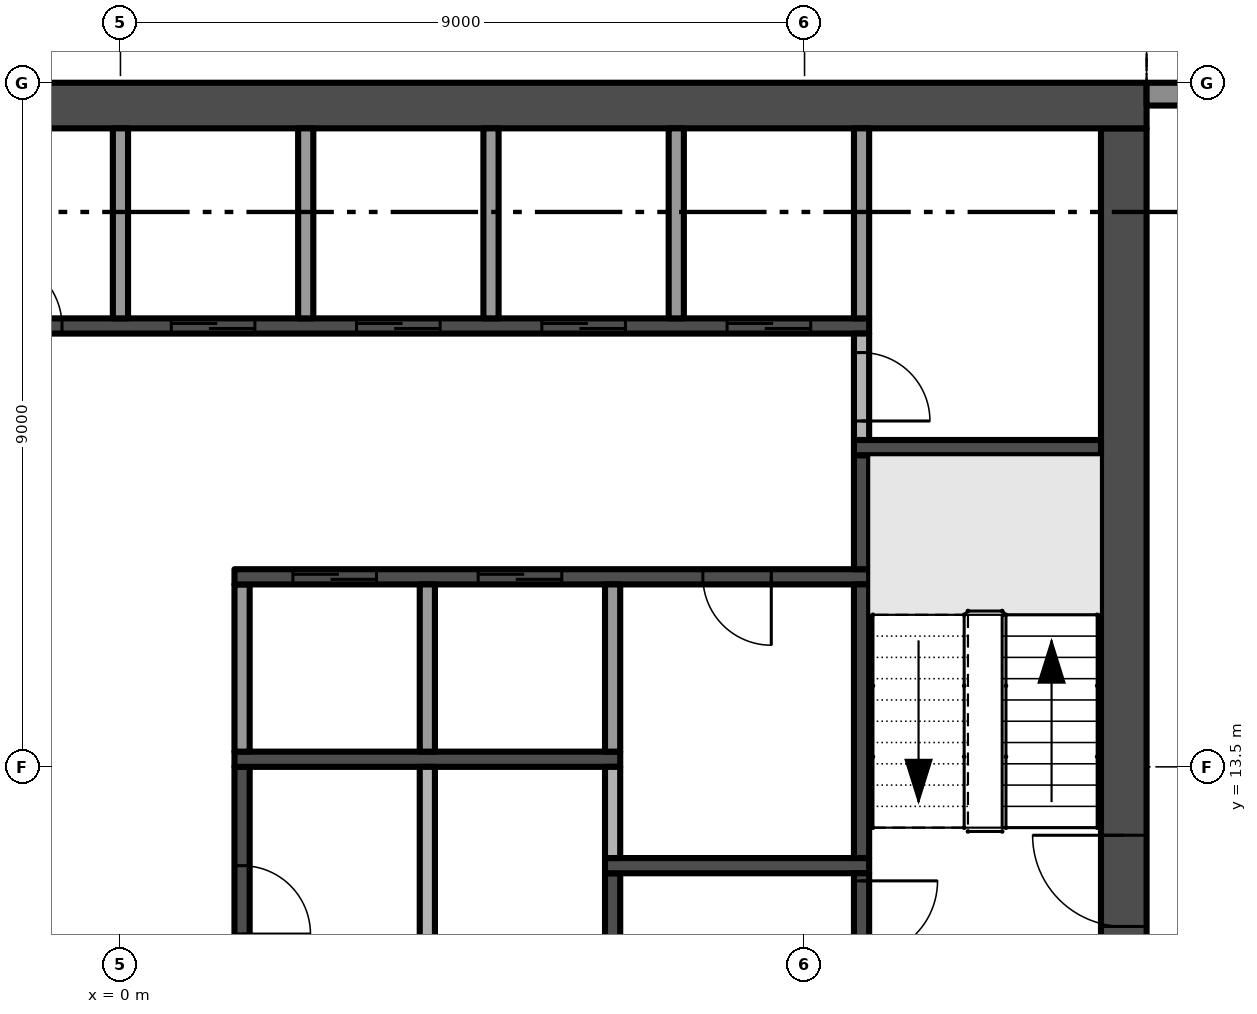
"""IFC4 building model, lengths in metres.
Left out: names, types, materials, properties, quantities, classifications, styles, units other than length and angle.
Written with IfcOpenShell. Run it as: python <this file> out.ifc"""

import sys

from ifc_helpers import new_model, si_unit, direction, frame, frame_2d, origin, place, context, subcontext, project, spatial, polyline, rectangle, outline, extrude, element, fill, save


model = new_model("IFC4")
c1 = context("Model", 3, precision=1e-05, world=origin(), true_north=direction((0.0, 1.0)))
c2 = subcontext(c1, "Body", "Model", "MODEL_VIEW")
j1 = project(units=[si_unit("LENGTHUNIT", "METRE"), si_unit("PLANEANGLEUNIT", "RADIAN")], contexts=[c1])
p1 = place(None, origin())
s1 = spatial("IfcSite", under=j1, at=p1, CompositionType="ELEMENT")
p2 = place(p1, origin())
s2 = spatial("IfcBuilding", under=s1, at=p2, CompositionType="ELEMENT")
p3 = place(p2, frame((0.0, 0.0, 250.2)))
s3 = spatial("IfcBuildingStorey", under=s2, at=p3, CompositionType="ELEMENT", Elevation=250.2)
p4 = place(p3, frame((13.2, 5.1, -0.3), z_axis=(0.0, 0.0, 1.0), x_axis=(0.0, 1.0, 0.0)))
e1 = element("IfcWall", 1, at=p4, inside=s3, PredefinedType="SHEAR", context=c2, shape_type="SweptSolid", body=[
    extrude(rectangle(XDim=16.8, YDim=0.6, at=frame_2d((8.4, 0.0))), origin(), (0.0, 0.0, 1.0), 3.8),
])
p5 = place(p4, frame((6.3, 0.0, 0.3)))
e2 = element("IfcOpeningElement", 2, at=p5, cuts=e1, PredefinedType="OPENING", context=c2, shape_type="SweptSolid", body=[
    extrude(rectangle(XDim=1.2, YDim=2.2, at=frame_2d((0.6, 1.1))), frame((0.0, 0.31, 0.0), z_axis=(0.0, -1.0, 0.0), x_axis=(1.0, 0.0, 0.0)), (0.0, 0.0, 1.0), 0.62),
])
p6 = place(p3, frame((13.5, 22.2, -0.3), z_axis=(0.0, 0.0, 1.0), x_axis=(-1.0, 0.0, 0.0)))
e3 = element("IfcWall", 3, at=p6, inside=s3, PredefinedType="SHEAR", context=c2, shape_type="SweptSolid", body=[
    extrude(rectangle(XDim=27.0, YDim=0.6, at=frame_2d((13.5, 0.0))), origin(), (0.0, 0.0, 1.0), 3.8),
])
p7 = place(p3, frame((13.5, 22.35, 0.0), z_axis=(0.0, 0.0, 1.0), x_axis=(1.0, 0.0, 0.0)))
e4 = element("IfcWall", 4, at=p7, inside=s3, PredefinedType="SOLIDWALL", context=c2, shape_type="SweptSolid", body=[
    extrude(rectangle(XDim=4.05, YDim=0.3, at=frame_2d((2.025, 0.0))), origin(), (0.0, 0.0, 1.0), 3.5),
])
p8 = place(p7, frame((0.55, 0.0, 0.45)))
e5 = element("IfcOpeningElement", 5, at=p8, cuts=e4, PredefinedType="OPENING", context=c2, shape_type="SweptSolid", body=[
    extrude(rectangle(XDim=3.2, YDim=2.65, at=frame_2d((1.6, 1.325))), frame((0.0, 0.16, 0.0), z_axis=(0.0, -1.0, 0.0), x_axis=(1.0, 0.0, 0.0)), (0.0, 0.0, 1.0), 0.32),
])
p9 = place(p3, origin())
e6 = element("IfcWall", 6, at=p9, inside=s3, PredefinedType="USERDEFINED", context=c2, shape_type="SweptSolid", body=[
    extrude(outline(polyline([(22.5, 25.5), (21.0, 25.271), (19.5, 24.671), (18.0, 23.929), (16.5, 23.329), (15.0, 23.1), (13.5, 23.329), (13.462, 23.082), (15.0, 22.847), (16.566, 23.086), (18.102, 23.701), (19.602, 24.442), (21.066, 25.028), (22.538, 25.253), (22.5, 25.5)])), origin(), (0.0, 0.0, 1.0), 0.9),
])
p10 = place(p3, frame((-9.85, 19.3, 0.0), z_axis=(0.0, 0.0, 1.0), x_axis=(1.0, 0.0, 0.0)))
e7 = element("IfcWall", 7, at=p10, inside=s3, PredefinedType="SHEAR", context=c2, shape_type="SweptSolid", body=[
    extrude(rectangle(XDim=19.7, YDim=0.2, at=frame_2d((9.85, 0.0))), origin(), (0.0, 0.0, 1.0), 3.5),
])
p11 = place(p10, frame((10.519, 0.0, 0.0)))
e8 = element("IfcOpeningElement", 8, at=p11, cuts=e7, PredefinedType="OPENING", context=c2, shape_type="SweptSolid", body=[
    extrude(rectangle(XDim=1.1, YDim=2.1, at=frame_2d((0.55, 1.05))), frame((0.0, 0.11, 0.0), z_axis=(0.0, -1.0, 0.0), x_axis=(1.0, 0.0, 0.0)), (0.0, 0.0, 1.0), 0.22),
])
p12 = place(p10, frame((12.956, 0.0, 0.0)))
e9 = element("IfcOpeningElement", 9, at=p12, cuts=e7, PredefinedType="OPENING", context=c2, shape_type="SweptSolid", body=[
    extrude(rectangle(XDim=1.1, YDim=2.1, at=frame_2d((0.55, 1.05))), frame((0.0, 0.11, 0.0), z_axis=(0.0, -1.0, 0.0), x_axis=(1.0, 0.0, 0.0)), (0.0, 0.0, 1.0), 0.22),
])
p13 = place(p10, frame((15.394, 0.0, 0.0)))
e10 = element("IfcOpeningElement", 10, at=p13, cuts=e7, PredefinedType="OPENING", context=c2, shape_type="SweptSolid", body=[
    extrude(rectangle(XDim=1.1, YDim=2.1, at=frame_2d((0.55, 1.05))), frame((0.0, 0.11, 0.0), z_axis=(0.0, -1.0, 0.0), x_axis=(1.0, 0.0, 0.0)), (0.0, 0.0, 1.0), 0.22),
])
p14 = place(p10, frame((17.831, 0.0, 0.0)))
e11 = element("IfcOpeningElement", 11, at=p14, cuts=e7, PredefinedType="OPENING", context=c2, shape_type="SweptSolid", body=[
    extrude(rectangle(XDim=1.1, YDim=2.1, at=frame_2d((0.55, 1.05))), frame((0.0, 0.11, 0.0), z_axis=(0.0, -1.0, 0.0), x_axis=(1.0, 0.0, 0.0)), (0.0, 0.0, 1.0), 0.22),
])
p15 = place(p10, frame((0.869, 0.0, 0.0)))
e12 = element("IfcOpeningElement", 12, at=p15, cuts=e7, PredefinedType="OPENING", context=c2, shape_type="SweptSolid", body=[
    extrude(rectangle(XDim=0.9, YDim=2.1, at=frame_2d((0.45, 1.05))), frame((0.0, 0.11, 0.0), z_axis=(0.0, -1.0, 0.0), x_axis=(1.0, 0.0, 0.0)), (0.0, 0.0, 1.0), 0.22),
])
p16 = place(p10, frame((4.525, 0.0, 0.0)))
e13 = element("IfcOpeningElement", 13, at=p16, cuts=e7, PredefinedType="OPENING", context=c2, shape_type="SweptSolid", body=[
    extrude(rectangle(XDim=0.9, YDim=2.1, at=frame_2d((0.45, 1.05))), frame((0.0, 0.11, 0.0), z_axis=(0.0, -1.0, 0.0), x_axis=(1.0, 0.0, 0.0)), (0.0, 0.0, 1.0), 0.22),
])
p17 = place(p10, frame((8.181, 0.0, 0.0)))
e14 = element("IfcOpeningElement", 14, at=p17, cuts=e7, PredefinedType="OPENING", context=c2, shape_type="SweptSolid", body=[
    extrude(rectangle(XDim=0.9, YDim=2.1, at=frame_2d((0.45, 1.05))), frame((0.0, 0.11, 0.0), z_axis=(0.0, -1.0, 0.0), x_axis=(1.0, 0.0, 0.0)), (0.0, 0.0, 1.0), 0.22),
])
p18 = place(p3, frame((0.0, 19.4, 0.0), z_axis=(0.0, 0.0, 1.0), x_axis=(0.0, 1.0, 0.0)))
e15 = element("IfcWall", 15, at=p18, inside=s3, PredefinedType="PARTITIONING", context=c2, shape_type="SweptSolid", body=[
    extrude(rectangle(XDim=2.5, YDim=0.2, at=frame_2d((1.25, 0.0))), origin(), (0.0, 0.0, 1.0), 3.5),
])
p19 = place(p3, frame((1.6, 13.5, 0.0), z_axis=(0.0, 0.0, 1.0), x_axis=(0.0, -1.0, 0.0)))
e16 = element("IfcWall", 16, at=p19, inside=s3, PredefinedType="SHEAR", context=c2, shape_type="SweptSolid", body=[
    extrude(rectangle(XDim=3.5, YDim=0.2, at=frame_2d((1.75, 0.0))), origin(), (0.0, 0.0, 1.0), 3.5),
])
p20 = place(p19, frame((1.3, 0.0, 0.0)))
e17 = element("IfcOpeningElement", 17, at=p20, cuts=e16, PredefinedType="OPENING", context=c2, shape_type="SweptSolid", body=[
    extrude(rectangle(XDim=0.9, YDim=2.1, at=frame_2d((0.45, 1.05))), frame((0.0, 0.11, 0.0), z_axis=(0.0, -1.0, 0.0), x_axis=(1.0, 0.0, 0.0)), (0.0, 0.0, 1.0), 0.22),
])
p21 = place(p3, frame((1.5, 13.6, 0.0), z_axis=(0.0, 0.0, 1.0), x_axis=(1.0, 0.0, 0.0)))
e18 = element("IfcWall", 18, at=p21, inside=s3, PredefinedType="SHEAR", context=c2, shape_type="SweptSolid", body=[
    extrude(rectangle(XDim=5.075, YDim=0.2, at=frame_2d((2.538, 0.0))), origin(), (0.0, 0.0, 1.0), 3.5),
])
p22 = place(p3, frame((1.6, 13.7, 0.0), z_axis=(0.0, 0.0, 1.0), x_axis=(0.0, 1.0, 0.0)))
e19 = element("IfcWall", 19, at=p22, inside=s3, PredefinedType="PARTITIONING", context=c2, shape_type="SweptSolid", body=[
    extrude(rectangle(XDim=2.2, YDim=0.2, at=frame_2d((1.1, 0.0))), origin(), (0.0, 0.0, 1.0), 3.5),
])
p23 = place(p3, frame((9.85, 16.0, 0.0), z_axis=(0.0, 0.0, 1.0), x_axis=(-1.0, 0.0, 0.0)))
e20 = element("IfcWall", 20, at=p23, inside=s3, PredefinedType="SHEAR", context=c2, shape_type="SweptSolid", body=[
    extrude(rectangle(XDim=8.35, YDim=0.2, at=frame_2d((4.175, 0.0))), origin(), (0.0, 0.0, 1.0), 3.5),
])
p24 = place(p23, frame((6.481, 0.0, 0.0)))
e21 = element("IfcOpeningElement", 21, at=p24, cuts=e20, PredefinedType="OPENING", context=c2, shape_type="SweptSolid", body=[
    extrude(rectangle(XDim=1.1, YDim=2.1, at=frame_2d((0.55, 1.05))), frame((0.0, 0.11, 0.0), z_axis=(0.0, -1.0, 0.0), x_axis=(1.0, 0.0, 0.0)), (0.0, 0.0, 1.0), 0.22),
])
p25 = place(p23, frame((4.044, 0.0, 0.0)))
e22 = element("IfcOpeningElement", 22, at=p25, cuts=e20, PredefinedType="OPENING", context=c2, shape_type="SweptSolid", body=[
    extrude(rectangle(XDim=1.1, YDim=2.1, at=frame_2d((0.55, 1.05))), frame((0.0, 0.11, 0.0), z_axis=(0.0, -1.0, 0.0), x_axis=(1.0, 0.0, 0.0)), (0.0, 0.0, 1.0), 0.22),
])
p26 = place(p23, frame((1.288, 0.0, 0.0)))
e23 = element("IfcOpeningElement", 23, at=p26, cuts=e20, PredefinedType="OPENING", context=c2, shape_type="SweptSolid", body=[
    extrude(rectangle(XDim=0.9, YDim=2.1, at=frame_2d((0.45, 1.05))), frame((0.0, 0.11, 0.0), z_axis=(0.0, -1.0, 0.0), x_axis=(1.0, 0.0, 0.0)), (0.0, 0.0, 1.0), 0.22),
])
p27 = place(p3, frame((2.438, 19.4, 0.0), z_axis=(0.0, 0.0, 1.0), x_axis=(0.0, 1.0, 0.0)))
e24 = element("IfcWall", 24, at=p27, inside=s3, PredefinedType="PARTITIONING", context=c2, shape_type="SweptSolid", body=[
    extrude(rectangle(XDim=2.5, YDim=0.2, at=frame_2d((1.25, 0.0))), origin(), (0.0, 0.0, 1.0), 3.5),
])
p28 = place(p3, frame((4.037, 10.0, 0.0), z_axis=(0.0, 0.0, 1.0), x_axis=(0.0, 1.0, 0.0)))
e25 = element("IfcWall", 25, at=p28, inside=s3, PredefinedType="PARTITIONING", context=c2, shape_type="SweptSolid", body=[
    extrude(rectangle(XDim=3.5, YDim=0.2, at=frame_2d((1.75, 0.0))), origin(), (0.0, 0.0, 1.0), 3.5),
])
p29 = place(p3, frame((4.037, 13.7, 0.0), z_axis=(0.0, 0.0, 1.0), x_axis=(0.0, 1.0, 0.0)))
e26 = element("IfcWall", 26, at=p29, inside=s3, PredefinedType="PARTITIONING", context=c2, shape_type="SweptSolid", body=[
    extrude(rectangle(XDim=2.2, YDim=0.2, at=frame_2d((1.1, 0.0))), origin(), (0.0, 0.0, 1.0), 3.5),
])
p30 = place(p3, frame((4.875, 19.4, 0.0), z_axis=(0.0, 0.0, 1.0), x_axis=(0.0, 1.0, 0.0)))
e27 = element("IfcWall", 27, at=p30, inside=s3, PredefinedType="PARTITIONING", context=c2, shape_type="SweptSolid", body=[
    extrude(rectangle(XDim=2.5, YDim=0.2, at=frame_2d((1.25, 0.0))), origin(), (0.0, 0.0, 1.0), 3.5),
])
p31 = place(p3, frame((6.475, 10.0, 0.0), z_axis=(0.0, 0.0, 1.0), x_axis=(0.0, 1.0, 0.0)))
e28 = element("IfcWall", 28, at=p31, inside=s3, PredefinedType="SHEAR", context=c2, shape_type="SweptSolid", body=[
    extrude(rectangle(XDim=2.1, YDim=0.2, at=frame_2d((1.05, 0.0))), origin(), (0.0, 0.0, 1.0), 3.5),
])
p32 = place(p3, frame((6.375, 12.2, 0.0), z_axis=(0.0, 0.0, 1.0), x_axis=(1.0, 0.0, 0.0)))
e29 = element("IfcWall", 29, at=p32, inside=s3, PredefinedType="SHEAR", context=c2, shape_type="SweptSolid", body=[
    extrude(rectangle(XDim=3.475, YDim=0.2, at=frame_2d((1.738, 0.0))), origin(), (0.0, 0.0, 1.0), 3.5),
])
p33 = place(p3, frame((6.475, 12.3, 0.0), z_axis=(0.0, 0.0, 1.0), x_axis=(0.0, 1.0, 0.0)))
e30 = element("IfcWall", 30, at=p33, inside=s3, PredefinedType="PARTITIONING", context=c2, shape_type="SweptSolid", body=[
    extrude(rectangle(XDim=1.2, YDim=0.2, at=frame_2d((0.6, 0.0))), origin(), (0.0, 0.0, 1.0), 3.5),
])
p34 = place(p3, frame((6.475, 13.7, 0.0), z_axis=(0.0, 0.0, 1.0), x_axis=(0.0, 1.0, 0.0)))
e31 = element("IfcWall", 31, at=p34, inside=s3, PredefinedType="PARTITIONING", context=c2, shape_type="SweptSolid", body=[
    extrude(rectangle(XDim=2.2, YDim=0.2, at=frame_2d((1.1, 0.0))), origin(), (0.0, 0.0, 1.0), 3.5),
])
p35 = place(p3, frame((7.312, 19.4, 0.0), z_axis=(0.0, 0.0, 1.0), x_axis=(0.0, 1.0, 0.0)))
e32 = element("IfcWall", 32, at=p35, inside=s3, PredefinedType="PARTITIONING", context=c2, shape_type="SweptSolid", body=[
    extrude(rectangle(XDim=2.5, YDim=0.2, at=frame_2d((1.25, 0.0))), origin(), (0.0, 0.0, 1.0), 3.5),
])
p36 = place(p3, frame((9.75, 12.1, 0.0), z_axis=(0.0, 0.0, 1.0), x_axis=(0.0, -1.0, 0.0)))
e33 = element("IfcWall", 33, at=p36, inside=s3, PredefinedType="SHEAR", context=c2, shape_type="SweptSolid", body=[
    extrude(rectangle(XDim=1.9, YDim=0.2, at=frame_2d((0.95, 0.0))), origin(), (0.0, 0.0, 1.0), 3.5),
])
p37 = place(p36, frame((0.1, 0.0, 0.0)))
e34 = element("IfcOpeningElement", 34, at=p37, cuts=e33, PredefinedType="OPENING", context=c2, shape_type="SweptSolid", body=[
    extrude(rectangle(XDim=1.0, YDim=2.2, at=frame_2d((0.5, 1.1))), frame((0.0, 0.11, 0.0), z_axis=(0.0, -1.0, 0.0), x_axis=(1.0, 0.0, 0.0)), (0.0, 0.0, 1.0), 0.22),
])
p38 = place(p3, frame((9.75, 12.3, 0.0), z_axis=(0.0, 0.0, 1.0), x_axis=(0.0, 1.0, 0.0)))
e35 = element("IfcWall", 35, at=p38, inside=s3, PredefinedType="SHEAR", context=c2, shape_type="SweptSolid", body=[
    extrude(rectangle(XDim=3.6, YDim=0.2, at=frame_2d((1.8, 0.0))), origin(), (0.0, 0.0, 1.0), 3.5),
])
p39 = place(p3, frame((9.75, 16.1, 0.0), z_axis=(0.0, 0.0, 1.0), x_axis=(0.0, 1.0, 0.0)))
e36 = element("IfcWall", 36, at=p39, inside=s3, PredefinedType="SHEAR", context=c2, shape_type="SweptSolid", body=[
    extrude(rectangle(XDim=1.5, YDim=0.2, at=frame_2d((0.75, 0.0))), origin(), (0.0, 0.0, 1.0), 3.5),
])
p40 = place(p3, frame((9.65, 17.7, 0.0), z_axis=(0.0, 0.0, 1.0), x_axis=(1.0, 0.0, 0.0)))
e37 = element("IfcWall", 37, at=p40, inside=s3, PredefinedType="SHEAR", context=c2, shape_type="SweptSolid", body=[
    extrude(rectangle(XDim=3.25, YDim=0.2, at=frame_2d((1.625, 0.0))), origin(), (0.0, 0.0, 1.0), 3.5),
])
p41 = place(p3, frame((9.75, 19.2, 0.0), z_axis=(0.0, 0.0, 1.0), x_axis=(0.0, -1.0, 0.0)))
e38 = element("IfcWall", 38, at=p41, inside=s3, PredefinedType="PARTITIONING", context=c2, shape_type="SweptSolid", body=[
    extrude(rectangle(XDim=1.4, YDim=0.2, at=frame_2d((0.7, 0.0))), origin(), (0.0, 0.0, 1.0), 3.5),
])
p42 = place(p41, frame((0.25, 0.0, 0.0)))
e39 = element("IfcOpeningElement", 39, at=p42, cuts=e38, PredefinedType="OPENING", context=c2, shape_type="SweptSolid", body=[
    extrude(rectangle(XDim=0.9, YDim=2.1, at=frame_2d((0.45, 1.05))), frame((0.0, 0.11, 0.0), z_axis=(0.0, -1.0, 0.0), x_axis=(1.0, 0.0, 0.0)), (0.0, 0.0, 1.0), 0.22),
])
p43 = place(p3, frame((9.75, 19.4, 0.0), z_axis=(0.0, 0.0, 1.0), x_axis=(0.0, 1.0, 0.0)))
e40 = element("IfcWall", 40, at=p43, inside=s3, PredefinedType="PARTITIONING", context=c2, shape_type="SweptSolid", body=[
    extrude(rectangle(XDim=2.5, YDim=0.2, at=frame_2d((1.25, 0.0))), origin(), (0.0, 0.0, 1.0), 3.5),
])
p44 = place(p5, frame((1.2, 0.0, 0.0), z_axis=(0.0, 0.0, 1.0), x_axis=(-1.0, 0.0, 0.0)))
e41 = element("IfcDoor", 41, at=p44, inside=s3, OperationType="SINGLE_SWING_LEFT", PredefinedType="DOOR", context=c2, shape_type="SweptSolid", body=[
    extrude(rectangle(XDim=1.2, YDim=2.2, at=frame_2d((0.6, 1.1))), frame((0.0, 0.025, 0.0), z_axis=(0.0, -1.0, 0.0), x_axis=(1.0, 0.0, 0.0)), (0.0, 0.0, 1.0), 0.05),
])
fill(e2, e41)
p45 = place(p37, origin())
e42 = element("IfcDoor", 42, at=p45, inside=s3, OperationType="SINGLE_SWING_LEFT", PredefinedType="DOOR", context=c2, shape_type="SweptSolid", body=[
    extrude(rectangle(XDim=1.0, YDim=2.2, at=frame_2d((0.5, 1.1))), frame((0.0, 0.025, 0.0), z_axis=(0.0, -1.0, 0.0), x_axis=(1.0, 0.0, 0.0)), (0.0, 0.0, 1.0), 0.05),
])
fill(e34, e42)
p46 = place(p11, origin())
e43 = element("IfcDoor", 43, at=p46, inside=s3, OperationType="SLIDING_TO_RIGHT", PredefinedType="DOOR", context=c2, shape_type="SweptSolid", body=[
    extrude(rectangle(XDim=1.1, YDim=2.1, at=frame_2d((0.55, 1.05))), frame((0.0, 0.025, 0.0), z_axis=(0.0, -1.0, 0.0), x_axis=(1.0, 0.0, 0.0)), (0.0, 0.0, 1.0), 0.05),
])
fill(e8, e43)
p47 = place(p12, origin())
e44 = element("IfcDoor", 44, at=p47, inside=s3, OperationType="SLIDING_TO_RIGHT", PredefinedType="DOOR", context=c2, shape_type="SweptSolid", body=[
    extrude(rectangle(XDim=1.1, YDim=2.1, at=frame_2d((0.55, 1.05))), frame((0.0, 0.025, 0.0), z_axis=(0.0, -1.0, 0.0), x_axis=(1.0, 0.0, 0.0)), (0.0, 0.0, 1.0), 0.05),
])
fill(e9, e44)
p48 = place(p13, origin())
e45 = element("IfcDoor", 45, at=p48, inside=s3, OperationType="SLIDING_TO_RIGHT", PredefinedType="DOOR", context=c2, shape_type="SweptSolid", body=[
    extrude(rectangle(XDim=1.1, YDim=2.1, at=frame_2d((0.55, 1.05))), frame((0.0, 0.025, 0.0), z_axis=(0.0, -1.0, 0.0), x_axis=(1.0, 0.0, 0.0)), (0.0, 0.0, 1.0), 0.05),
])
fill(e10, e45)
p49 = place(p14, origin())
e46 = element("IfcDoor", 46, at=p49, inside=s3, OperationType="SLIDING_TO_RIGHT", PredefinedType="DOOR", context=c2, shape_type="SweptSolid", body=[
    extrude(rectangle(XDim=1.1, YDim=2.1, at=frame_2d((0.55, 1.05))), frame((0.0, 0.025, 0.0), z_axis=(0.0, -1.0, 0.0), x_axis=(1.0, 0.0, 0.0)), (0.0, 0.0, 1.0), 0.05),
])
fill(e11, e46)
p50 = place(p24, origin())
e47 = element("IfcDoor", 47, at=p50, inside=s3, OperationType="SLIDING_TO_RIGHT", PredefinedType="DOOR", context=c2, shape_type="SweptSolid", body=[
    extrude(rectangle(XDim=1.1, YDim=2.1, at=frame_2d((0.55, 1.05))), frame((0.0, 0.025, 0.0), z_axis=(0.0, -1.0, 0.0), x_axis=(1.0, 0.0, 0.0)), (0.0, 0.0, 1.0), 0.05),
])
fill(e21, e47)
p51 = place(p25, origin())
e48 = element("IfcDoor", 48, at=p51, inside=s3, OperationType="SLIDING_TO_RIGHT", PredefinedType="DOOR", context=c2, shape_type="SweptSolid", body=[
    extrude(rectangle(XDim=1.1, YDim=2.1, at=frame_2d((0.55, 1.05))), frame((0.0, 0.025, 0.0), z_axis=(0.0, -1.0, 0.0), x_axis=(1.0, 0.0, 0.0)), (0.0, 0.0, 1.0), 0.05),
])
fill(e22, e48)
p52 = place(p20, origin())
e49 = element("IfcDoor", 49, at=p52, inside=s3, OperationType="SINGLE_SWING_RIGHT", PredefinedType="DOOR", context=c2, shape_type="SweptSolid", body=[
    extrude(rectangle(XDim=0.9, YDim=2.1, at=frame_2d((0.45, 1.05))), frame((0.0, 0.025, 0.0), z_axis=(0.0, -1.0, 0.0), x_axis=(1.0, 0.0, 0.0)), (0.0, 0.0, 1.0), 0.05),
])
fill(e17, e49)
p53 = place(p26, origin())
e50 = element("IfcDoor", 50, at=p53, inside=s3, OperationType="SINGLE_SWING_LEFT", PredefinedType="DOOR", context=c2, shape_type="SweptSolid", body=[
    extrude(rectangle(XDim=0.9, YDim=2.1, at=frame_2d((0.45, 1.05))), frame((0.0, 0.025, 0.0), z_axis=(0.0, -1.0, 0.0), x_axis=(1.0, 0.0, 0.0)), (0.0, 0.0, 1.0), 0.05),
])
fill(e23, e50)
p54 = place(p42, origin())
e51 = element("IfcDoor", 51, at=p54, inside=s3, OperationType="SINGLE_SWING_RIGHT", PredefinedType="DOOR", context=c2, shape_type="SweptSolid", body=[
    extrude(rectangle(XDim=0.9, YDim=2.1, at=frame_2d((0.45, 1.05))), frame((0.0, 0.025, 0.0), z_axis=(0.0, -1.0, 0.0), x_axis=(1.0, 0.0, 0.0)), (0.0, 0.0, 1.0), 0.05),
])
fill(e39, e51)
p55 = place(p17, origin())
e52 = element("IfcDoor", 52, at=p55, inside=s3, OperationType="SINGLE_SWING_LEFT", PredefinedType="DOOR", context=c2, shape_type="SweptSolid", body=[
    extrude(rectangle(XDim=0.9, YDim=2.1, at=frame_2d((0.45, 1.05))), frame((0.0, 0.025, 0.0), z_axis=(0.0, -1.0, 0.0), x_axis=(1.0, 0.0, 0.0)), (0.0, 0.0, 1.0), 0.05),
])
fill(e14, e52)
save(model, sys.argv[1])
